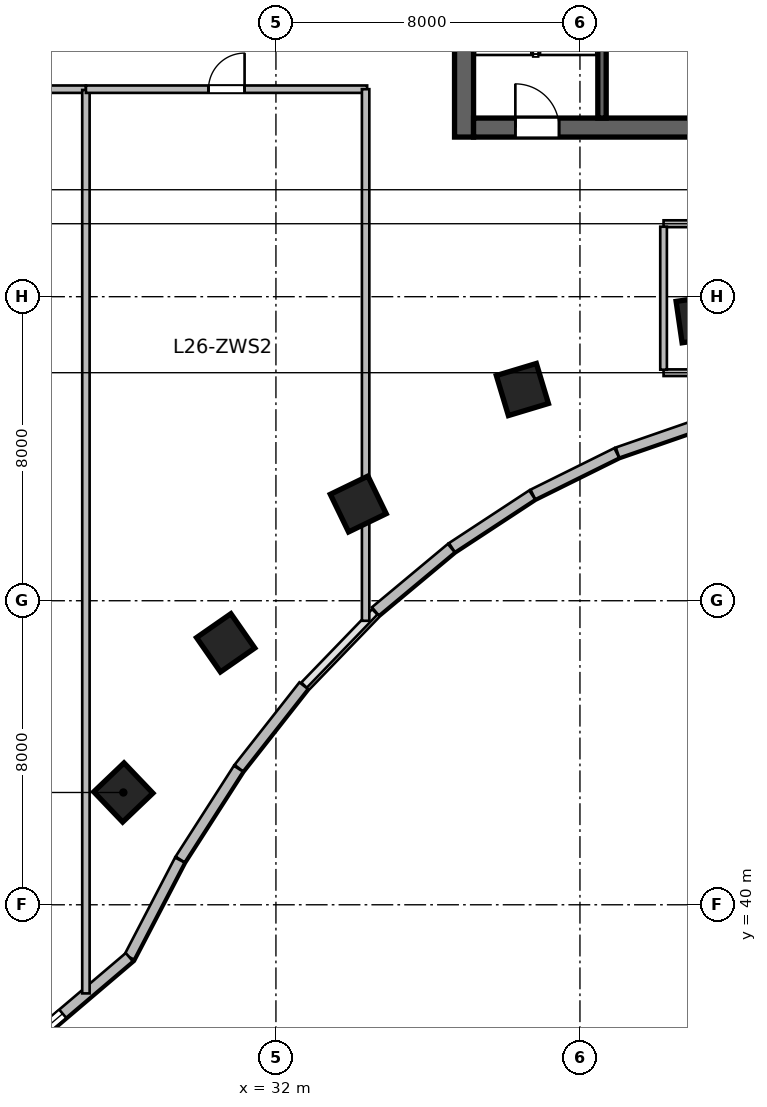
"""IFC4 building model, lengths in metres.
Left out: names, types, materials, properties, quantities, classifications, styles, units other than length and angle.
Written with IfcOpenShell. Run it as: python <this file> out.ifc"""

import sys

from ifc_helpers import new_model, si_unit, direction, frame, frame_2d, origin, origin_2d, place, context, subcontext, project, spatial, rectangle, extrude, source, transform, mapped, element, fill, save


model = new_model("IFC4")
c1 = context("Model", 3, precision=1e-05, world=origin(), true_north=direction((0.0, 1.0)))
c2 = subcontext(c1, "Body", "Model", "MODEL_VIEW")
j1 = project(units=[si_unit("LENGTHUNIT", "METRE"), si_unit("PLANEANGLEUNIT", "RADIAN")], contexts=[c1])
p1 = place(None, origin())
s1 = spatial("IfcSite", under=j1, at=p1, CompositionType="ELEMENT")
p2 = place(p1, origin())
s2 = spatial("IfcBuilding", under=s1, at=p2, CompositionType="ELEMENT")
p3 = place(p2, frame((0.0, 0.0, 111.6)))
s3 = spatial("IfcBuildingStorey", under=s2, at=p3, CompositionType="ELEMENT", Elevation=111.6)
m1 = source(origin(), c2, "Body", "SweptSolid", [
    extrude(rectangle(XDim=12.0, YDim=0.5, at=frame_2d((6.0, 0.0))), origin(), (0.0, 0.0, 1.0), 3.9),
])
p4 = place(p3, frame((36.95, 60.2, 0.0), z_axis=(0.0, 0.0, 1.0), x_axis=(0.0, 1.0, 0.0)))
e1 = element("IfcWall", 1, at=p4, inside=s3, PredefinedType="SHEAR", context=c2, shape_type="MappedRepresentation", body=[
    mapped(m1, transform((0.0, 0.0, 0.0), scale=1.0)),
])
m2 = source(origin(), c2, "Body", "SweptSolid", [
    extrude(rectangle(XDim=21.6, YDim=0.5, at=frame_2d((10.8, 0.0))), origin(), (0.0, 0.0, 1.0), 3.9),
])
p5 = place(p3, frame((37.2, 60.45, 0.0), z_axis=(0.0, 0.0, 1.0), x_axis=(1.0, 0.0, 0.0)))
e2 = element("IfcWall", 2, at=p5, inside=s3, PredefinedType="SHEAR", context=c2, shape_type="MappedRepresentation", body=[
    mapped(m2, transform((0.0, 0.0, 0.0), scale=1.0)),
])
p6 = place(p5, frame((1.1, 0.0, 0.0)))
e3 = element("IfcOpeningElement", 3, at=p6, cuts=e2, PredefinedType="OPENING", context=c2, shape_type="SweptSolid", body=[
    extrude(rectangle(XDim=1.15, YDim=2.15, at=frame_2d((0.575, 1.075))), frame((0.0, 0.26, 0.0), z_axis=(0.0, -1.0, 0.0), x_axis=(1.0, 0.0, 0.0)), (0.0, 0.0, 1.0), 0.52),
])
p7 = place(p5, frame((19.5, 0.0, 0.0)))
e4 = element("IfcOpeningElement", 4, at=p7, cuts=e2, PredefinedType="OPENING", context=c2, shape_type="SweptSolid", body=[
    extrude(rectangle(XDim=0.9, YDim=2.1, at=frame_2d((0.45, 1.05))), frame((0.0, 0.26, 0.0), z_axis=(0.0, -1.0, 0.0), x_axis=(1.0, 0.0, 0.0)), (0.0, 0.0, 1.0), 0.52),
])
p8 = place(p5, frame((12.02, 0.0, 0.0)))
e5 = element("IfcOpeningElement", 5, at=p8, cuts=e2, PredefinedType="OPENING", context=c2, shape_type="SweptSolid", body=[
    extrude(rectangle(XDim=1.6, YDim=2.15, at=frame_2d((0.8, 1.075))), frame((0.0, 0.26, 0.0), z_axis=(0.0, -1.0, 0.0), x_axis=(1.0, 0.0, 0.0)), (0.0, 0.0, 1.0), 0.52),
])
m3 = source(origin(), c2, "Body", "SweptSolid", [
    extrude(rectangle(XDim=11.0, YDim=0.22, at=frame_2d((5.5, 0.0))), origin(), (0.0, 0.0, 1.0), 3.9),
])
p9 = place(p3, frame((40.58, 60.7, 0.0), z_axis=(0.0, 0.0, 1.0), x_axis=(0.0, 1.0, 0.0)))
e6 = element("IfcWall", 6, at=p9, inside=s3, PredefinedType="SHEAR", context=c2, shape_type="MappedRepresentation", body=[
    mapped(m3, transform((0.0, 0.0, 0.0), scale=1.0)),
])
m4 = source(origin(), c2, "Body", "SweptSolid", [
    extrude(rectangle(XDim=1.1, YDim=1.1, at=origin_2d()), origin(), (0.0, 0.0, 1.0), 3.9),
])
for number, where, z_axis, x_axis in (
    (7, (27.985, 42.955, 0.0), (0.0, 0.0, 1.0), (-0.691, 0.723, 0.0)),
    (8, (30.677, 46.892, 0.0), (0.0, 0.0, 1.0), (-0.571, 0.821, 0.0)),
    (9, (34.166, 50.545, 0.0), (0.0, 0.0, 1.0), (-0.436, 0.9, 0.0)),
    (10, (38.485, 53.558, 0.0), (0.0, 0.0, 1.0), (-0.289, 0.957, 0.0)),
    (11, (43.154, 55.411, 0.0), (0.0, 0.0, 1.0), (-0.143, 0.99, 0.0)),
):
    element("IfcColumn", number, at=place(p3, frame(where, z_axis=z_axis, x_axis=x_axis)), inside=s3, PredefinedType="COLUMN", context=c2, shape_type="MappedRepresentation", body=[
        mapped(m4, transform((0.0, 0.0, 0.0), scale=1.0)),
    ])
m5 = source(origin(), c2, "Body", "SweptSolid", [
    extrude(rectangle(XDim=2.411, YDim=0.28, at=frame_2d((1.205, 0.0))), origin(), (0.0, 0.0, 1.0), 3.65),
])
p10 = place(p3, frame((43.266, 52.689, 0.0), z_axis=(0.0, 0.0, 1.0), x_axis=(-0.944880068161, -0.327416640982, 0.0)))
e12 = element("IfcWall", 12, at=p10, inside=s3, PredefinedType="SOLIDWALL", context=c2, shape_type="MappedRepresentation", body=[
    mapped(m5, transform((0.0, 0.0, 0.0), scale=1.0)),
])
m6 = source(origin(), c2, "Body", "SweptSolid", [
    extrude(rectangle(XDim=2.462, YDim=0.28, at=frame_2d((1.231, 0.0))), origin(), (0.0, 0.0, 1.0), 3.65),
])
p11 = place(p3, frame((40.967, 51.891, 0.0), z_axis=(0.0, 0.0, 1.0), x_axis=(-0.8959882207, -0.444077817917, 0.0)))
e13 = element("IfcWall", 13, at=p11, inside=s3, PredefinedType="SOLIDWALL", context=c2, shape_type="MappedRepresentation", body=[
    mapped(m6, transform((0.0, 0.0, 0.0), scale=1.0)),
])
m7 = source(origin(), c2, "Body", "SweptSolid", [
    extrude(rectangle(XDim=2.527, YDim=0.28, at=frame_2d((1.264, 0.0))), origin(), (0.0, 0.0, 1.0), 3.65),
])
p12 = place(p3, frame((38.742, 50.786, 0.0), z_axis=(0.0, 0.0, 1.0), x_axis=(-0.836011905051, -0.548711303523, 0.0)))
e14 = element("IfcWall", 14, at=p12, inside=s3, PredefinedType="SOLIDWALL", context=c2, shape_type="MappedRepresentation", body=[
    mapped(m7, transform((0.0, 0.0, 0.0), scale=1.0)),
])
m8 = source(origin(), c2, "Body", "SweptSolid", [
    extrude(rectangle(XDim=2.601, YDim=0.28, at=frame_2d((1.3, 0.0))), origin(), (0.0, 0.0, 1.0), 3.65),
])
p13 = place(p3, frame((36.613, 49.387, 0.0), z_axis=(0.0, 0.0, 1.0), x_axis=(-0.76796730295, -0.640489048775, 0.0)))
e15 = element("IfcWall", 15, at=p13, inside=s3, PredefinedType="SOLIDWALL", context=c2, shape_type="MappedRepresentation", body=[
    mapped(m8, transform((0.0, 0.0, 0.0), scale=1.0)),
])
m9 = source(origin(), c2, "Body", "SweptSolid", [
    extrude(rectangle(XDim=2.76, YDim=0.28, at=frame_2d((1.38, 0.0))), origin(), (0.0, 0.0, 1.0), 3.65),
])
p14 = place(p3, frame((32.728, 45.766, 0.0), z_axis=(0.0, 0.0, 1.0), x_axis=(-0.618180818641, -0.786035925047, 0.0)))
e16 = element("IfcWall", 16, at=p14, inside=s3, PredefinedType="SOLIDWALL", context=c2, shape_type="MappedRepresentation", body=[
    mapped(m9, transform((0.0, 0.0, 0.0), scale=1.0)),
])
m10 = source(origin(), c2, "Body", "SweptSolid", [
    extrude(rectangle(XDim=2.84, YDim=0.28, at=frame_2d((1.42, 0.0))), origin(), (0.0, 0.0, 1.0), 3.65),
])
p15 = place(p3, frame((31.011, 43.582, 0.0), z_axis=(0.0, 0.0, 1.0), x_axis=(-0.540214368057, -0.841527442538, 0.0)))
e17 = element("IfcWall", 17, at=p15, inside=s3, PredefinedType="SOLIDWALL", context=c2, shape_type="MappedRepresentation", body=[
    mapped(m10, transform((0.0, 0.0, 0.0), scale=1.0)),
])
m11 = source(origin(), c2, "Body", "SweptSolid", [
    extrude(rectangle(XDim=2.88, YDim=0.28, at=frame_2d((1.44, 0.0))), origin(), (0.0, 0.0, 1.0), 3.65),
])
p16 = place(p3, frame((29.469, 41.178, 0.0), z_axis=(0.0, 0.0, 1.0), x_axis=(-0.461769086658, -0.887000175088, 0.0)))
e18 = element("IfcWall", 18, at=p16, inside=s3, PredefinedType="SOLIDWALL", context=c2, shape_type="MappedRepresentation", body=[
    mapped(m11, transform((0.0, 0.0, 0.0), scale=1.0)),
])
m12 = source(origin(), c2, "Body", "SweptSolid", [
    extrude(rectangle(XDim=4.659, YDim=0.28, at=frame_2d((2.33, 0.0))), origin(), (0.0, 0.0, 1.0), 3.65),
])
p17 = place(p3, frame((28.139, 38.624, 0.0), z_axis=(0.0, 0.0, 1.0), x_axis=(-0.761913458795, -0.647678841176, 0.0)))
e19 = element("IfcWall", 19, at=p17, inside=s3, PredefinedType="SOLIDWALL", context=c2, shape_type="MappedRepresentation", body=[
    mapped(m12, transform((0.0, 0.0, 0.0), scale=1.0)),
])
p18 = place(p17, frame((2.299, 0.0, 0.95)))
e20 = element("IfcOpeningElement", 20, at=p18, cuts=e19, PredefinedType="OPENING", context=c2, shape_type="SweptSolid", body=[
    extrude(rectangle(XDim=2.2, YDim=2.1, at=frame_2d((1.1, 1.05))), frame((0.0, 0.15, 0.0), z_axis=(0.0, -1.0, 0.0), x_axis=(1.0, 0.0, 0.0)), (0.0, 0.0, 1.0), 0.3),
])
m13 = source(origin(), c2, "Body", "SweptSolid", [
    extrude(rectangle(XDim=4.176, YDim=0.175, at=frame_2d((2.088, 0.0))), origin(), (0.0, 0.0, 1.0), 3.65),
])
p19 = place(p3, frame((42.2, 54.0, 0.0), z_axis=(0.0, 0.0, 1.0), x_axis=(1.0, 0.0, 0.0)))
e21 = element("IfcWall", 21, at=p19, inside=s3, PredefinedType="PARTITIONING", context=c2, shape_type="MappedRepresentation", body=[
    mapped(m13, transform((0.0, 0.0, 0.0), scale=1.0)),
])
m14 = source(origin(), c2, "Body", "SweptSolid", [
    extrude(rectangle(XDim=4.176, YDim=0.18, at=frame_2d((2.088, 0.0))), origin(), (0.0, 0.0, 1.0), 3.65),
])
p20 = place(p3, frame((42.2, 57.92, 0.0), z_axis=(0.0, 0.0, 1.0), x_axis=(1.0, 0.0, 0.0)))
e22 = element("IfcWall", 22, at=p20, inside=s3, PredefinedType="PLUMBINGWALL", context=c2, shape_type="MappedRepresentation", body=[
    mapped(m14, transform((0.0, 0.0, 0.0), scale=1.0)),
])
p21 = place(p20, frame((1.638, 0.0, 0.0)))
e23 = element("IfcOpeningElement", 23, at=p21, cuts=e22, PredefinedType="OPENING", context=c2, shape_type="SweptSolid", body=[
    extrude(rectangle(XDim=0.9, YDim=2.08, at=frame_2d((0.45, 1.04))), frame((0.0, 0.1, 0.0), z_axis=(0.0, -1.0, 0.0), x_axis=(1.0, 0.0, 0.0)), (0.0, 0.0, 1.0), 0.2),
])
m15 = source(origin(), c2, "Body", "SweptSolid", [
    extrude(rectangle(XDim=3.763, YDim=0.175, at=frame_2d((1.881, 0.0))), origin(), (0.0, 0.0, 1.0), 3.65),
])
p22 = place(p3, frame((42.2, 54.079, 0.0), z_axis=(0.0, 0.0, 1.0), x_axis=(0.0, 1.0, 0.0)))
e24 = element("IfcWall", 24, at=p22, inside=s3, PredefinedType="PARTITIONING", context=c2, shape_type="MappedRepresentation", body=[
    mapped(m15, transform((0.0, 0.0, 0.0), scale=1.0)),
])
m16 = source(origin(), c2, "Body", "SweptSolid", [
    extrude(rectangle(XDim=3.82, YDim=0.195, at=frame_2d((1.91, 0.0))), origin(), (0.0, 0.0, 1.0), 3.65),
])
p23 = place(p3, frame((23.18, 61.46, 0.0), z_axis=(0.0, 0.0, 1.0), x_axis=(1.0, 0.0, 0.0)))
e25 = element("IfcWall", 25, at=p23, inside=s3, PredefinedType="PARTITIONING", context=c2, shape_type="MappedRepresentation", body=[
    mapped(m16, transform((0.0, 0.0, 0.0), scale=1.0)),
])
p24 = place(p23, frame((1.435, 0.0, 0.0)))
e26 = element("IfcOpeningElement", 26, at=p24, cuts=e25, PredefinedType="OPENING", context=c2, shape_type="SweptSolid", body=[
    extrude(rectangle(XDim=0.95, YDim=2.1, at=frame_2d((0.475, 1.05))), frame((0.0, 0.107, 0.0), z_axis=(0.0, -1.0, 0.0), x_axis=(1.0, 0.0, 0.0)), (0.0, 0.0, 1.0), 0.215),
])
m17 = source(origin(), c2, "Body", "SweptSolid", [
    extrude(rectangle(XDim=23.771, YDim=0.195, at=frame_2d((11.886, 0.0))), origin(), (0.0, 0.0, 1.0), 2.942),
])
p25 = place(p3, frame((27.0, 37.668, 0.0), z_axis=(0.0, 0.0, 1.0), x_axis=(0.0, 1.0, 0.0)))
e27 = element("IfcWall", 27, at=p25, inside=s3, PredefinedType="PARTITIONING", context=c2, shape_type="MappedRepresentation", body=[
    mapped(m17, transform((0.0, 0.0, 0.0), scale=1.0)),
])
m18 = source(origin(), c2, "Body", "SweptSolid", [
    extrude(rectangle(XDim=7.4, YDim=0.195, at=frame_2d((3.7, 0.0))), origin(), (0.0, 0.0, 1.0), 3.65),
])
p26 = place(p3, frame((27.0, 61.46, 0.0), z_axis=(0.0, 0.0, 1.0), x_axis=(1.0, 0.0, 0.0)))
e28 = element("IfcWall", 28, at=p26, inside=s3, PredefinedType="PARTITIONING", context=c2, shape_type="MappedRepresentation", body=[
    mapped(m18, transform((0.0, 0.0, 0.0), scale=1.0)),
])
p27 = place(p26, frame((3.225, 0.0, 0.0)))
e29 = element("IfcOpeningElement", 29, at=p27, cuts=e28, PredefinedType="OPENING", context=c2, shape_type="SweptSolid", body=[
    extrude(rectangle(XDim=0.95, YDim=2.1, at=frame_2d((0.475, 1.05))), frame((0.0, 0.107, 0.0), z_axis=(0.0, -1.0, 0.0), x_axis=(1.0, 0.0, 0.0)), (0.0, 0.0, 1.0), 0.215),
])
m19 = source(origin(), c2, "Body", "SweptSolid", [
    extrude(rectangle(XDim=13.988, YDim=0.195, at=frame_2d((6.994, 0.0))), origin(), (0.0, 0.0, 1.0), 3.65),
])
p28 = place(p3, frame((34.36, 47.472, 0.0), z_axis=(0.0, 0.0, 1.0), x_axis=(0.0, 1.0, 0.0)))
e30 = element("IfcWall", 30, at=p28, inside=s3, PredefinedType="PARTITIONING", context=c2, shape_type="MappedRepresentation", body=[
    mapped(m19, transform((0.0, 0.0, 0.0), scale=1.0)),
])
m20 = source(origin(), c2, "Body", "SweptSolid", [
    extrude(rectangle(XDim=2.2, YDim=2.1, at=frame_2d((1.1, 1.05))), frame((0.0, 0.03, 0.0), z_axis=(0.0, -1.0, 0.0), x_axis=(1.0, 0.0, 0.0)), (0.0, 0.0, 1.0), 0.06),
])
p29 = place(p18, origin())
e31 = element("IfcWindow", 31, at=p29, inside=s3, PartitioningType="TRIPLE_PANEL_VERTICAL", PredefinedType="WINDOW", context=c2, shape_type="MappedRepresentation", body=[
    mapped(m20, transform((0.0, 0.0, 0.0), scale=1.0)),
])
fill(e20, e31)
m21 = source(origin(), c2, "Body", "SweptSolid", [
    extrude(rectangle(XDim=1.15, YDim=2.15, at=frame_2d((0.575, 1.075))), frame((0.0, 0.025, 0.0), z_axis=(0.0, -1.0, 0.0), x_axis=(1.0, 0.0, 0.0)), (0.0, 0.0, 1.0), 0.05),
])
p30 = place(p6, origin())
e32 = element("IfcDoor", 32, at=p30, inside=s3, OperationType="SINGLE_SWING_LEFT", PredefinedType="DOOR", context=c2, shape_type="MappedRepresentation", body=[
    mapped(m21, transform((0.0, 0.0, 0.0), scale=1.0)),
])
fill(e3, e32)
m22 = source(origin(), c2, "Body", "SweptSolid", [
    extrude(rectangle(XDim=0.95, YDim=2.1, at=frame_2d((0.475, 1.05))), frame((0.0, 0.025, 0.0), z_axis=(0.0, -1.0, 0.0), x_axis=(1.0, 0.0, 0.0)), (0.0, 0.0, 1.0), 0.05),
])
p31 = place(p27, origin())
e33 = element("IfcDoor", 33, at=p31, inside=s3, OperationType="SINGLE_SWING_RIGHT", PredefinedType="DOOR", context=c2, shape_type="MappedRepresentation", body=[
    mapped(m22, transform((0.0, 0.0, 0.0), scale=1.0)),
])
fill(e29, e33)
save(model, sys.argv[1])
